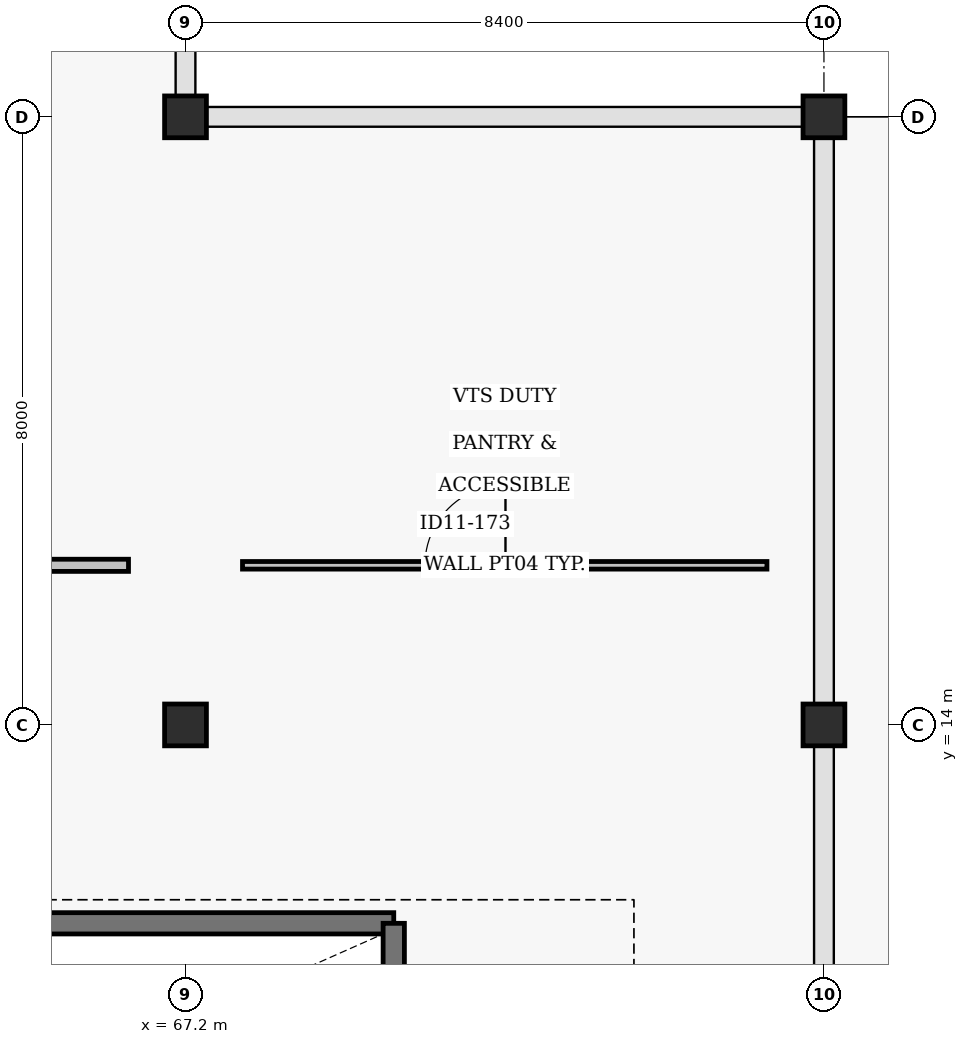
"""IFC4 building model, lengths in metres.
Left out: names, types, materials, properties, quantities, classifications, styles, units other than length and angle.
Written with IfcOpenShell. Run it as: python <this file> out.ifc"""

import sys

from ifc_helpers import new_model, si_unit, direction, frame, frame_2d, origin, origin_2d, place, context, subcontext, project, spatial, rectangle, extrude, element, fill, save


model = new_model("IFC4")
c1 = context("Model", 3, precision=1e-05, world=origin(), true_north=direction((0.0, 1.0)))
c2 = subcontext(c1, "Body", "Model", "MODEL_VIEW")
j1 = project(units=[si_unit("LENGTHUNIT", "METRE"), si_unit("PLANEANGLEUNIT", "RADIAN")], contexts=[c1])
p1 = place(None, origin())
s1 = spatial("IfcSite", under=j1, at=p1, CompositionType="ELEMENT")
p2 = place(p1, origin())
s2 = spatial("IfcBuilding", under=s1, at=p2, CompositionType="ELEMENT")
p3 = place(p2, frame((0.0, 0.0, 16.32)))
s3 = spatial("IfcBuildingStorey", under=s2, at=p3, CompositionType="ELEMENT", Elevation=16.32)
for number, where, z_axis, x_axis in (
    (1, (67.2, 14.0, 0.0), (0.0, 0.0, 1.0), (1.0, 0.0, 0.0)),
    (2, (67.2, 22.0, 0.0), (0.0, 0.0, 1.0), (1.0, 0.0, 0.0)),
    (3, (75.6, 14.0, 0.0), (0.0, 0.0, 1.0), (1.0, 0.0, 0.0)),
    (4, (75.6, 22.0, 0.0), (0.0, 0.0, 1.0), (1.0, 0.0, 0.0)),
):
    element("IfcColumn", number, at=place(p3, frame(where, z_axis=z_axis, x_axis=x_axis)), inside=s3, PredefinedType="COLUMN", context=c2, shape_type="SweptSolid", body=[
        extrude(rectangle(XDim=0.55, YDim=0.55, at=origin_2d()), origin(), (0.0, 0.0, 1.0), 3.2),
    ])
p4 = place(p3, frame((61.06, 11.39, 0.0), z_axis=(0.0, 0.0, 1.0), x_axis=(1.0, 0.0, 0.0)))
e5 = element("IfcWall", 5, at=p4, inside=s3, PredefinedType="SHEAR", context=c2, shape_type="SweptSolid", body=[
    extrude(rectangle(XDim=8.88, YDim=0.28, at=frame_2d((4.44, 0.0))), origin(), (0.0, 0.0, 1.0), 3.2),
])
p5 = place(p3, frame((69.94, 7.96, 0.0), z_axis=(0.0, 0.0, 1.0), x_axis=(0.0, 1.0, 0.0)))
e6 = element("IfcWall", 6, at=p5, inside=s3, PredefinedType="SHEAR", context=c2, shape_type="SweptSolid", body=[
    extrude(rectangle(XDim=3.43, YDim=0.28, at=frame_2d((1.715, 0.0))), origin(), (0.0, 0.0, 1.0), 3.2),
])
p6 = place(p3, frame((59.55, 16.1, 0.0), z_axis=(0.0, 0.0, 1.0), x_axis=(1.0, 0.0, 0.0)))
e7 = element("IfcWall", 7, at=p6, inside=s3, PredefinedType="PARTITIONING", context=c2, shape_type="SweptSolid", body=[
    extrude(rectangle(XDim=6.9, YDim=0.16, at=frame_2d((3.45, 0.0))), origin(), (0.0, 0.0, 1.0), 2.5),
])
p7 = place(p6, frame((2.4, 0.0, 0.0)))
e8 = element("IfcOpeningElement", 8, at=p7, cuts=e7, PredefinedType="OPENING", context=c2, shape_type="SweptSolid", body=[
    extrude(rectangle(XDim=1.04, YDim=2.14, at=frame_2d((0.52, 1.07))), frame((0.0, 0.09, 0.0), z_axis=(0.0, -1.0, 0.0), x_axis=(1.0, 0.0, 0.0)), (0.0, 0.0, 1.0), 0.18),
])
p8 = place(p3, frame((67.95, 16.1, 0.0), z_axis=(0.0, 0.0, 1.0), x_axis=(1.0, 0.0, 0.0)))
e9 = element("IfcWall", 9, at=p8, inside=s3, PredefinedType="PARTITIONING", context=c2, shape_type="SweptSolid", body=[
    extrude(rectangle(XDim=6.9, YDim=0.1, at=frame_2d((3.45, 0.0))), origin(), (0.0, 0.0, 1.0), 2.5),
])
p9 = place(p8, frame((2.4, 0.0, 0.0)))
e10 = element("IfcOpeningElement", 10, at=p9, cuts=e9, PredefinedType="OPENING", context=c2, shape_type="SweptSolid", body=[
    extrude(rectangle(XDim=1.06, YDim=2.1, at=frame_2d((0.53, 1.05))), frame((0.0, 0.06, 0.0), z_axis=(0.0, -1.0, 0.0), x_axis=(1.0, 0.0, 0.0)), (0.0, 0.0, 1.0), 0.12),
])
p10 = place(p9, origin())
e11 = element("IfcDoor", 11, at=p10, inside=s3, OperationType="SINGLE_SWING_RIGHT", PredefinedType="DOOR", context=c2, shape_type="SweptSolid", body=[
    extrude(rectangle(XDim=1.06, YDim=2.1, at=frame_2d((0.53, 1.05))), frame((0.0, 0.025, 0.0), z_axis=(0.0, -1.0, 0.0), x_axis=(1.0, 0.0, 0.0)), (0.0, 0.0, 1.0), 0.05),
])
fill(e10, e11)
save(model, sys.argv[1])
